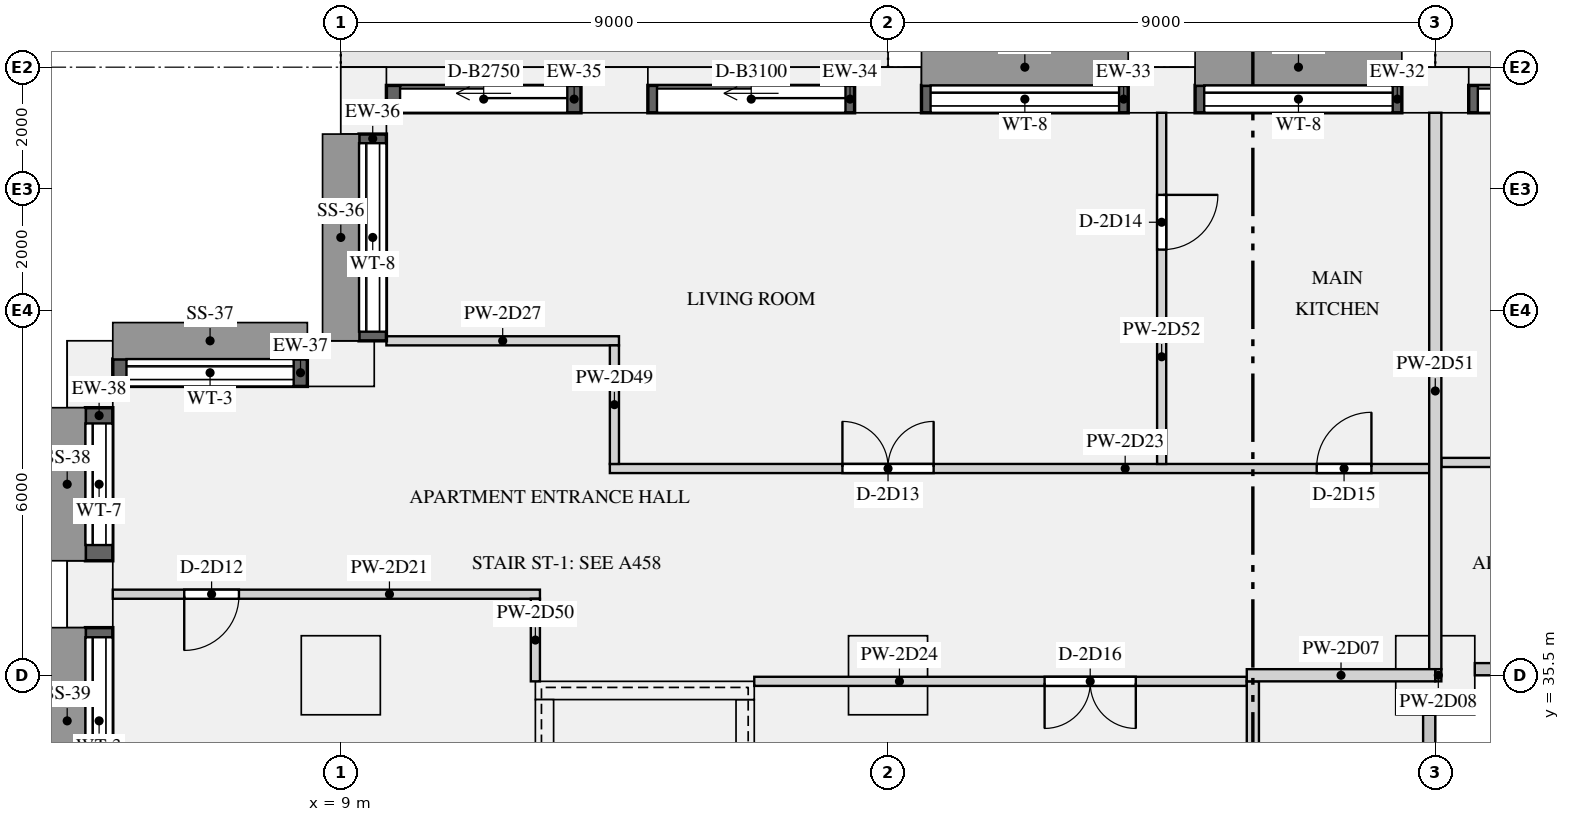
"""IFC4 building model, lengths in metres.
Left out: names, types, materials, properties, quantities, classifications, styles, units other than length and angle.
Written with IfcOpenShell. Run it as: python <this file> out.ifc"""

import sys

from ifc_helpers import new_model, si_unit, direction, frame, frame_2d, origin, origin_2d, place, context, subcontext, project, spatial, rectangle, extrude, element, fill, save


model = new_model("IFC4")
c1 = context("Model", 3, precision=1e-05, world=origin(), true_north=direction((0.0, 1.0)))
c2 = subcontext(c1, "Body", "Model", "MODEL_VIEW")
j1 = project(units=[si_unit("LENGTHUNIT", "METRE"), si_unit("PLANEANGLEUNIT", "RADIAN")], contexts=[c1])
p1 = place(None, origin())
s1 = spatial("IfcSite", under=j1, at=p1, CompositionType="ELEMENT")
p2 = place(p1, origin())
s2 = spatial("IfcBuilding", under=s1, at=p2, CompositionType="ELEMENT")
p3 = place(p2, frame((0.0, 0.0, 111.9)))
s3 = spatial("IfcBuildingStorey", under=s2, at=p3, CompositionType="ELEMENT", Elevation=111.9)
for number, where, z_axis, x_axis in (
    (1, (27.0, 45.125, 0.0), (0.0, 0.0, 1.0), (-1.0, 0.0, 0.0)),
    (2, (22.5, 45.125, 0.0), (0.0, 0.0, 1.0), (-1.0, 0.0, 0.0)),
    (3, (18.0, 45.125, 0.0), (0.0, 0.0, 1.0), (-1.0, 0.0, 0.0)),
    (4, (13.5, 45.125, 0.0), (0.0, 0.0, 1.0), (-1.0, 0.0, 0.0)),
    (5, (9.375, 44.95, 0.0), (0.0, 0.0, 1.0), (0.0, -1.0, 0.0)),
    (6, (9.0, 40.625, 0.0), (0.0, 0.0, 1.0), (-1.0, 0.0, 0.0)),
    (7, (4.875, 40.45, 0.0), (0.0, 0.0, 1.0), (0.0, -1.0, 0.0)),
    (8, (4.875, 36.833, 0.0), (0.0, 0.0, 1.0), (0.0, -1.0, 0.0)),
):
    element("IfcColumn", number, at=place(p3, frame(where, z_axis=z_axis, x_axis=x_axis)), inside=s3, PredefinedType="USERDEFINED", context=c2, shape_type="SweptSolid", body=[
        extrude(rectangle(XDim=1.1, YDim=0.75, at=origin_2d()), origin(), (0.0, 0.0, 1.0), 3.15),
    ])
for number, where, z_axis, x_axis in (
    (9, (9.0, 35.5, 0.0), (0.0, 0.0, 1.0), (1.0, 0.0, 0.0)),
    (10, (18.0, 35.5, 0.0), (0.0, 0.0, 1.0), (1.0, 0.0, 0.0)),
    (11, (27.0, 35.5, 0.0), (0.0, 0.0, 1.0), (1.0, 0.0, 0.0)),
):
    element("IfcColumn", number, at=place(p3, frame(where, z_axis=z_axis, x_axis=x_axis)), inside=s3, PredefinedType="COLUMN", context=c2, shape_type="SweptSolid", body=[
        extrude(rectangle(XDim=1.3, YDim=1.3, at=origin_2d()), origin(), (0.0, 0.0, 1.0), 3.15),
    ])
p4 = place(p3, frame((12.2, 35.25, 0.0), z_axis=(0.0, 0.0, 1.0), x_axis=(1.0, 0.0, 0.0)))
e12 = element("IfcWall", 12, at=p4, inside=s3, PredefinedType="SHEAR", context=c2, shape_type="SweptSolid", body=[
    extrude(rectangle(XDim=3.6, YDim=0.3, at=frame_2d((1.8, 0.0))), origin(), (0.0, 0.0, 1.0), 3.15),
])
for number, where, z_axis, x_axis in (
    (13, (12.35, 27.3, 0.0), (0.0, 0.0, 1.0), (0.0, 1.0, 0.0)),
    (14, (15.65, 27.3, 0.0), (0.0, 0.0, 1.0), (0.0, 1.0, 0.0)),
):
    element("IfcWall", number, at=place(p3, frame(where, z_axis=z_axis, x_axis=x_axis)), inside=s3, PredefinedType="SHEAR", context=c2, shape_type="SweptSolid", body=[
        extrude(rectangle(XDim=7.8, YDim=0.3, at=frame_2d((3.9, 0.0))), origin(), (0.0, 0.0, 1.0), 3.15),
    ])
p5 = place(p3, frame((30.95, 44.975, 0.0), z_axis=(0.0, 0.0, 1.0), x_axis=(-1.0, 0.0, 0.0)))
e15 = element("IfcWall", 15, at=p5, inside=s3, PredefinedType="SOLIDWALL", context=c2, shape_type="SweptSolid", body=[
    extrude(rectangle(XDim=3.4, YDim=0.45, at=frame_2d((1.7, 0.0))), origin(), (0.0, 0.0, 1.0), 2.83),
])
p6 = place(p5, frame((0.15, 0.0, 0.0)))
e16 = element("IfcOpeningElement", 16, at=p6, cuts=e15, PredefinedType="OPENING", context=c2, shape_type="SweptSolid", body=[
    extrude(rectangle(XDim=3.1, YDim=2.3, at=frame_2d((1.55, 1.15))), frame((0.0, 0.235, 0.0), z_axis=(0.0, -1.0, 0.0), x_axis=(1.0, 0.0, 0.0)), (0.0, 0.0, 1.0), 0.47),
])
p7 = place(p3, frame((26.45, 44.975, 0.9), z_axis=(0.0, 0.0, 1.0), x_axis=(-1.0, 0.0, 0.0)))
e17 = element("IfcWall", 17, at=p7, inside=s3, PredefinedType="SOLIDWALL", context=c2, shape_type="SweptSolid", body=[
    extrude(rectangle(XDim=3.4, YDim=0.45, at=frame_2d((1.7, 0.0))), origin(), (0.0, 0.0, 1.0), 1.93),
])
p8 = place(p7, frame((0.15, 0.0, 0.15)))
e18 = element("IfcOpeningElement", 18, at=p8, cuts=e17, PredefinedType="OPENING", context=c2, shape_type="SweptSolid", body=[
    extrude(rectangle(XDim=3.1, YDim=1.5, at=frame_2d((1.55, 0.75))), frame((0.0, 0.235, 0.0), z_axis=(0.0, -1.0, 0.0), x_axis=(1.0, 0.0, 0.0)), (0.0, 0.0, 1.0), 0.47),
])
p9 = place(p3, frame((21.95, 44.975, 0.9), z_axis=(0.0, 0.0, 1.0), x_axis=(-1.0, 0.0, 0.0)))
e19 = element("IfcWall", 19, at=p9, inside=s3, PredefinedType="SOLIDWALL", context=c2, shape_type="SweptSolid", body=[
    extrude(rectangle(XDim=3.4, YDim=0.45, at=frame_2d((1.7, 0.0))), origin(), (0.0, 0.0, 1.0), 1.93),
])
p10 = place(p9, frame((0.15, 0.0, 0.15)))
e20 = element("IfcOpeningElement", 20, at=p10, cuts=e19, PredefinedType="OPENING", context=c2, shape_type="SweptSolid", body=[
    extrude(rectangle(XDim=3.1, YDim=1.5, at=frame_2d((1.55, 0.75))), frame((0.0, 0.235, 0.0), z_axis=(0.0, -1.0, 0.0), x_axis=(1.0, 0.0, 0.0)), (0.0, 0.0, 1.0), 0.47),
])
p11 = place(p3, frame((17.45, 44.975, 0.0), z_axis=(0.0, 0.0, 1.0), x_axis=(-1.0, 0.0, 0.0)))
e21 = element("IfcWall", 21, at=p11, inside=s3, PredefinedType="SOLIDWALL", context=c2, shape_type="SweptSolid", body=[
    extrude(rectangle(XDim=3.4, YDim=0.45, at=frame_2d((1.7, 0.0))), origin(), (0.0, 0.0, 1.0), 2.83),
])
p12 = place(p11, frame((0.15, 0.0, 0.0)))
e22 = element("IfcOpeningElement", 22, at=p12, cuts=e21, PredefinedType="OPENING", context=c2, shape_type="SweptSolid", body=[
    extrude(rectangle(XDim=3.1, YDim=2.3, at=frame_2d((1.55, 1.15))), frame((0.0, 0.235, 0.0), z_axis=(0.0, -1.0, 0.0), x_axis=(1.0, 0.0, 0.0)), (0.0, 0.0, 1.0), 0.47),
])
p13 = place(p3, frame((12.95, 44.975, 0.0), z_axis=(0.0, 0.0, 1.0), x_axis=(-1.0, 0.0, 0.0)))
e23 = element("IfcWall", 23, at=p13, inside=s3, PredefinedType="SOLIDWALL", context=c2, shape_type="SweptSolid", body=[
    extrude(rectangle(XDim=3.2, YDim=0.45, at=frame_2d((1.6, 0.0))), origin(), (0.0, 0.0, 1.0), 2.83),
])
p14 = place(p13, frame((0.225, 0.0, 0.0)))
e24 = element("IfcOpeningElement", 24, at=p14, cuts=e23, PredefinedType="OPENING", context=c2, shape_type="SweptSolid", body=[
    extrude(rectangle(XDim=2.75, YDim=2.3, at=frame_2d((1.375, 1.15))), frame((0.0, 0.235, 0.0), z_axis=(0.0, -1.0, 0.0), x_axis=(1.0, 0.0, 0.0)), (0.0, 0.0, 1.0), 0.47),
])
p15 = place(p3, frame((9.525, 44.4, 0.9), z_axis=(0.0, 0.0, 1.0), x_axis=(0.0, -1.0, 0.0)))
e25 = element("IfcWall", 25, at=p15, inside=s3, PredefinedType="SOLIDWALL", context=c2, shape_type="SweptSolid", body=[
    extrude(rectangle(XDim=3.4, YDim=0.45, at=frame_2d((1.7, 0.0))), origin(), (0.0, 0.0, 1.0), 1.93),
])
p16 = place(p15, frame((0.15, 0.0, 0.15)))
e26 = element("IfcOpeningElement", 26, at=p16, cuts=e25, PredefinedType="OPENING", context=c2, shape_type="SweptSolid", body=[
    extrude(rectangle(XDim=3.1, YDim=1.5, at=frame_2d((1.55, 0.75))), frame((0.0, 0.235, 0.0), z_axis=(0.0, -1.0, 0.0), x_axis=(1.0, 0.0, 0.0)), (0.0, 0.0, 1.0), 0.47),
])
p17 = place(p3, frame((8.45, 40.475, 0.9), z_axis=(0.0, 0.0, 1.0), x_axis=(-1.0, 0.0, 0.0)))
e27 = element("IfcWall", 27, at=p17, inside=s3, PredefinedType="SOLIDWALL", context=c2, shape_type="SweptSolid", body=[
    extrude(rectangle(XDim=3.2, YDim=0.45, at=frame_2d((1.6, 0.0))), origin(), (0.0, 0.0, 1.0), 1.93),
])
p18 = place(p17, frame((0.225, 0.0, 0.15)))
e28 = element("IfcOpeningElement", 28, at=p18, cuts=e27, PredefinedType="OPENING", context=c2, shape_type="SweptSolid", body=[
    extrude(rectangle(XDim=2.75, YDim=1.5, at=frame_2d((1.375, 0.75))), frame((0.0, 0.235, 0.0), z_axis=(0.0, -1.0, 0.0), x_axis=(1.0, 0.0, 0.0)), (0.0, 0.0, 1.0), 0.47),
])
p19 = place(p3, frame((5.025, 39.9, 0.9), z_axis=(0.0, 0.0, 1.0), x_axis=(0.0, -1.0, 0.0)))
e29 = element("IfcWall", 29, at=p19, inside=s3, PredefinedType="SOLIDWALL", context=c2, shape_type="SweptSolid", body=[
    extrude(rectangle(XDim=2.517, YDim=0.45, at=frame_2d((1.258, 0.0))), origin(), (0.0, 0.0, 1.0), 1.93),
])
p20 = place(p19, frame((0.259, 0.0, 0.15)))
e30 = element("IfcOpeningElement", 30, at=p20, cuts=e29, PredefinedType="OPENING", context=c2, shape_type="SweptSolid", body=[
    extrude(rectangle(XDim=2.0, YDim=1.5, at=frame_2d((1.0, 0.75))), frame((0.0, 0.235, 0.0), z_axis=(0.0, -1.0, 0.0), x_axis=(1.0, 0.0, 0.0)), (0.0, 0.0, 1.0), 0.47),
])
p21 = place(p3, frame((5.025, 36.283, 0.9), z_axis=(0.0, 0.0, 1.0), x_axis=(0.0, -1.0, 0.0)))
e31 = element("IfcWall", 31, at=p21, inside=s3, PredefinedType="SOLIDWALL", context=c2, shape_type="SweptSolid", body=[
    extrude(rectangle(XDim=3.066, YDim=0.45, at=frame_2d((1.533, 0.0))), origin(), (0.0, 0.0, 1.0), 1.93),
])
p22 = place(p21, frame((0.158, 0.0, 0.15)))
e32 = element("IfcOpeningElement", 32, at=p22, cuts=e31, PredefinedType="OPENING", context=c2, shape_type="SweptSolid", body=[
    extrude(rectangle(XDim=2.75, YDim=1.5, at=frame_2d((1.375, 0.75))), frame((0.0, 0.235, 0.0), z_axis=(0.0, -1.0, 0.0), x_axis=(1.0, 0.0, 0.0)), (0.0, 0.0, 1.0), 0.47),
])
p23 = place(p3, frame((23.9, 35.5, 0.0), z_axis=(0.0, 0.0, 1.0), x_axis=(1.0, 0.0, 0.0)))
e33 = element("IfcWall", 33, at=p23, inside=s3, PredefinedType="PARTITIONING", context=c2, shape_type="SweptSolid", body=[
    extrude(rectangle(XDim=3.1, YDim=0.2, at=frame_2d((1.55, 0.0))), origin(), (0.0, 0.0, 1.0), 2.83),
])
p24 = place(p3, frame((27.0, 35.5, 0.0), z_axis=(0.0, 0.0, 1.0), x_axis=(1.0, 0.0, 0.0)))
e34 = element("IfcWall", 34, at=p24, inside=s3, PredefinedType="PARTITIONING", context=c2, shape_type="SweptSolid", body=[
    extrude(rectangle(XDim=0.1, YDim=0.2, at=frame_2d((0.05, 0.0))), origin(), (0.0, 0.0, 1.0), 2.83),
])
p25 = place(p3, frame((5.25, 36.833, 0.0), z_axis=(0.0, 0.0, 1.0), x_axis=(1.0, 0.0, 0.0)))
e35 = element("IfcWall", 35, at=p25, inside=s3, PredefinedType="PARTITIONING", context=c2, shape_type="SweptSolid", body=[
    extrude(rectangle(XDim=7.025, YDim=0.15, at=frame_2d((3.512, 0.0))), origin(), (0.0, 0.0, 1.0), 2.83),
])
p26 = place(p25, frame((1.175, 0.0, 0.0)))
e36 = element("IfcOpeningElement", 36, at=p26, cuts=e35, PredefinedType="OPENING", context=c2, shape_type="SweptSolid", body=[
    extrude(rectangle(XDim=0.9, YDim=2.1, at=frame_2d((0.45, 1.05))), frame((0.0, 0.085, 0.0), z_axis=(0.0, -1.0, 0.0), x_axis=(1.0, 0.0, 0.0)), (0.0, 0.0, 1.0), 0.17),
])
p27 = place(p3, frame((13.425, 38.9, 0.0), z_axis=(0.0, 0.0, 1.0), x_axis=(1.0, 0.0, 0.0)))
e37 = element("IfcWall", 37, at=p27, inside=s3, PredefinedType="PARTITIONING", context=c2, shape_type="SweptSolid", body=[
    extrude(rectangle(XDim=13.475, YDim=0.15, at=frame_2d((6.737, 0.0))), origin(), (0.0, 0.0, 1.0), 2.83),
])
p28 = place(p27, frame((3.825, 0.0, 0.0)))
e38 = element("IfcOpeningElement", 38, at=p28, cuts=e37, PredefinedType="OPENING", context=c2, shape_type="SweptSolid", body=[
    extrude(rectangle(XDim=1.5, YDim=2.1, at=frame_2d((0.75, 1.05))), frame((0.0, 0.085, 0.0), z_axis=(0.0, -1.0, 0.0), x_axis=(1.0, 0.0, 0.0)), (0.0, 0.0, 1.0), 0.17),
])
p29 = place(p27, frame((11.625, 0.0, 0.0)))
e39 = element("IfcOpeningElement", 39, at=p29, cuts=e37, PredefinedType="OPENING", context=c2, shape_type="SweptSolid", body=[
    extrude(rectangle(XDim=0.9, YDim=2.1, at=frame_2d((0.45, 1.05))), frame((0.0, 0.085, 0.0), z_axis=(0.0, -1.0, 0.0), x_axis=(1.0, 0.0, 0.0)), (0.0, 0.0, 1.0), 0.17),
])
p30 = place(p3, frame((15.8, 35.4, 0.0), z_axis=(0.0, 0.0, 1.0), x_axis=(1.0, 0.0, 0.0)))
e40 = element("IfcWall", 40, at=p30, inside=s3, PredefinedType="PARTITIONING", context=c2, shape_type="SweptSolid", body=[
    extrude(rectangle(XDim=8.1, YDim=0.15, at=frame_2d((4.05, 0.0))), origin(), (0.0, 0.0, 1.0), 2.83),
])
p31 = place(p30, frame((4.775, 0.0, 0.0)))
e41 = element("IfcOpeningElement", 41, at=p31, cuts=e40, PredefinedType="OPENING", context=c2, shape_type="SweptSolid", body=[
    extrude(rectangle(XDim=1.5, YDim=2.1, at=frame_2d((0.75, 1.05))), frame((0.0, 0.085, 0.0), z_axis=(0.0, -1.0, 0.0), x_axis=(1.0, 0.0, 0.0)), (0.0, 0.0, 1.0), 0.17),
])
p32 = place(p3, frame((9.75, 41.0, 0.0), z_axis=(0.0, 0.0, 1.0), x_axis=(1.0, 0.0, 0.0)))
e42 = element("IfcWall", 42, at=p32, inside=s3, PredefinedType="PARTITIONING", context=c2, shape_type="SweptSolid", body=[
    extrude(rectangle(XDim=3.825, YDim=0.15, at=frame_2d((1.913, 0.0))), origin(), (0.0, 0.0, 1.0), 2.83),
])
p33 = place(p3, frame((27.1, 39.0, 0.0), z_axis=(0.0, 0.0, 1.0), x_axis=(1.0, 0.0, 0.0)))
e43 = element("IfcWall", 43, at=p33, inside=s3, PredefinedType="PARTITIONING", context=c2, shape_type="SweptSolid", body=[
    extrude(rectangle(XDim=22.475, YDim=0.15, at=frame_2d((11.237, 0.0))), origin(), (0.0, 0.0, 1.0), 2.83),
])
p34 = place(p33, frame((1.7, 0.0, 0.0)))
e44 = element("IfcOpeningElement", 44, at=p34, cuts=e43, PredefinedType="OPENING", context=c2, shape_type="SweptSolid", body=[
    extrude(rectangle(XDim=0.9, YDim=2.1, at=frame_2d((0.45, 1.05))), frame((0.0, 0.085, 0.0), z_axis=(0.0, -1.0, 0.0), x_axis=(1.0, 0.0, 0.0)), (0.0, 0.0, 1.0), 0.17),
])
p35 = place(p33, frame((6.2, 0.0, 0.0)))
e45 = element("IfcOpeningElement", 45, at=p35, cuts=e43, PredefinedType="OPENING", context=c2, shape_type="SweptSolid", body=[
    extrude(rectangle(XDim=0.9, YDim=2.1, at=frame_2d((0.45, 1.05))), frame((0.0, 0.085, 0.0), z_axis=(0.0, -1.0, 0.0), x_axis=(1.0, 0.0, 0.0)), (0.0, 0.0, 1.0), 0.17),
])
p36 = place(p33, frame((12.95, 0.0, 0.0)))
e46 = element("IfcOpeningElement", 46, at=p36, cuts=e43, PredefinedType="OPENING", context=c2, shape_type="SweptSolid", body=[
    extrude(rectangle(XDim=0.9, YDim=2.1, at=frame_2d((0.45, 1.05))), frame((0.0, 0.085, 0.0), z_axis=(0.0, -1.0, 0.0), x_axis=(1.0, 0.0, 0.0)), (0.0, 0.0, 1.0), 0.17),
])
p37 = place(p3, frame((24.0, 27.1, 0.0), z_axis=(0.0, 0.0, 1.0), x_axis=(0.0, 1.0, 0.0)))
e47 = element("IfcWall", 47, at=p37, inside=s3, PredefinedType="PARTITIONING", context=c2, shape_type="SweptSolid", body=[
    extrude(rectangle(XDim=8.3, YDim=0.2, at=frame_2d((4.15, 0.0))), origin(), (0.0, 0.0, 1.0), 2.83),
])
p38 = place(p3, frame((13.5, 38.975, 0.0), z_axis=(0.0, 0.0, 1.0), x_axis=(0.0, 1.0, 0.0)))
e48 = element("IfcWall", 48, at=p38, inside=s3, PredefinedType="PARTITIONING", context=c2, shape_type="SweptSolid", body=[
    extrude(rectangle(XDim=1.95, YDim=0.15, at=frame_2d((0.975, 0.0))), origin(), (0.0, 0.0, 1.0), 2.83),
])
p39 = place(p3, frame((12.2, 35.4, 0.0), z_axis=(0.0, 0.0, 1.0), x_axis=(0.0, 1.0, 0.0)))
e49 = element("IfcWall", 49, at=p39, inside=s3, PredefinedType="PARTITIONING", context=c2, shape_type="SweptSolid", body=[
    extrude(rectangle(XDim=1.358, YDim=0.15, at=frame_2d((0.679, 0.0))), origin(), (0.0, 0.0, 1.0), 2.83),
])
p40 = place(p3, frame((27.0, 35.6, 0.0), z_axis=(0.0, 0.0, 1.0), x_axis=(0.0, 1.0, 0.0)))
e50 = element("IfcWall", 50, at=p40, inside=s3, PredefinedType="PARTITIONING", context=c2, shape_type="SweptSolid", body=[
    extrude(rectangle(XDim=9.15, YDim=0.2, at=frame_2d((4.575, 0.0))), origin(), (0.0, 0.0, 1.0), 2.83),
])
p41 = place(p3, frame((22.5, 38.975, 0.0), z_axis=(0.0, 0.0, 1.0), x_axis=(0.0, 1.0, 0.0)))
e51 = element("IfcWall", 51, at=p41, inside=s3, PredefinedType="PARTITIONING", context=c2, shape_type="SweptSolid", body=[
    extrude(rectangle(XDim=5.775, YDim=0.15, at=frame_2d((2.887, 0.0))), origin(), (0.0, 0.0, 1.0), 2.83),
])
p42 = place(p41, frame((3.525, 0.0, 0.0)))
e52 = element("IfcOpeningElement", 52, at=p42, cuts=e51, PredefinedType="OPENING", context=c2, shape_type="SweptSolid", body=[
    extrude(rectangle(XDim=0.9, YDim=2.1, at=frame_2d((0.45, 1.05))), frame((0.0, 0.085, 0.0), z_axis=(0.0, -1.0, 0.0), x_axis=(1.0, 0.0, 0.0)), (0.0, 0.0, 1.0), 0.17),
])
p43 = place(p6, origin())
e53 = element("IfcDoor", 53, at=p43, inside=s3, OperationType="SLIDING_TO_LEFT", PredefinedType="DOOR", context=c2, shape_type="SweptSolid", body=[
    extrude(rectangle(XDim=3.1, YDim=2.3, at=frame_2d((1.55, 1.15))), frame((0.0, -0.07, 0.0), z_axis=(0.0, -1.0, 0.0), x_axis=(1.0, 0.0, 0.0)), (0.0, 0.0, 1.0), 0.05),
])
fill(e16, e53)
p44 = place(p8, origin())
e54 = element("IfcWindow", 54, at=p44, inside=s3, PartitioningType="SINGLE_PANEL", PredefinedType="WINDOW", context=c2, shape_type="SweptSolid", body=[
    extrude(rectangle(XDim=3.1, YDim=1.5, at=frame_2d((1.55, 0.75))), frame((0.0, -0.065, 0.0), z_axis=(0.0, -1.0, 0.0), x_axis=(1.0, 0.0, 0.0)), (0.0, 0.0, 1.0), 0.06),
])
fill(e18, e54)
p45 = place(p10, origin())
e55 = element("IfcWindow", 55, at=p45, inside=s3, PartitioningType="SINGLE_PANEL", PredefinedType="WINDOW", context=c2, shape_type="SweptSolid", body=[
    extrude(rectangle(XDim=3.1, YDim=1.5, at=frame_2d((1.55, 0.75))), frame((0.0, -0.065, 0.0), z_axis=(0.0, -1.0, 0.0), x_axis=(1.0, 0.0, 0.0)), (0.0, 0.0, 1.0), 0.06),
])
fill(e20, e55)
p46 = place(p12, origin())
e56 = element("IfcDoor", 56, at=p46, inside=s3, OperationType="SLIDING_TO_LEFT", PredefinedType="DOOR", context=c2, shape_type="SweptSolid", body=[
    extrude(rectangle(XDim=3.1, YDim=2.3, at=frame_2d((1.55, 1.15))), frame((0.0, -0.07, 0.0), z_axis=(0.0, -1.0, 0.0), x_axis=(1.0, 0.0, 0.0)), (0.0, 0.0, 1.0), 0.05),
])
fill(e22, e56)
p47 = place(p14, origin())
e57 = element("IfcDoor", 57, at=p47, inside=s3, OperationType="SLIDING_TO_LEFT", PredefinedType="DOOR", context=c2, shape_type="SweptSolid", body=[
    extrude(rectangle(XDim=2.75, YDim=2.3, at=frame_2d((1.375, 1.15))), frame((0.0, -0.07, 0.0), z_axis=(0.0, -1.0, 0.0), x_axis=(1.0, 0.0, 0.0)), (0.0, 0.0, 1.0), 0.05),
])
fill(e24, e57)
p48 = place(p16, origin())
e58 = element("IfcWindow", 58, at=p48, inside=s3, PartitioningType="SINGLE_PANEL", PredefinedType="WINDOW", context=c2, shape_type="SweptSolid", body=[
    extrude(rectangle(XDim=3.1, YDim=1.5, at=frame_2d((1.55, 0.75))), frame((0.0, -0.065, 0.0), z_axis=(0.0, -1.0, 0.0), x_axis=(1.0, 0.0, 0.0)), (0.0, 0.0, 1.0), 0.06),
])
fill(e26, e58)
p49 = place(p18, origin())
e59 = element("IfcWindow", 59, at=p49, inside=s3, PartitioningType="SINGLE_PANEL", PredefinedType="WINDOW", context=c2, shape_type="SweptSolid", body=[
    extrude(rectangle(XDim=2.75, YDim=1.5, at=frame_2d((1.375, 0.75))), frame((0.0, -0.065, 0.0), z_axis=(0.0, -1.0, 0.0), x_axis=(1.0, 0.0, 0.0)), (0.0, 0.0, 1.0), 0.06),
])
fill(e28, e59)
p50 = place(p20, origin())
e60 = element("IfcWindow", 60, at=p50, inside=s3, PartitioningType="SINGLE_PANEL", PredefinedType="WINDOW", context=c2, shape_type="SweptSolid", body=[
    extrude(rectangle(XDim=2.0, YDim=1.5, at=frame_2d((1.0, 0.75))), frame((0.0, -0.065, 0.0), z_axis=(0.0, -1.0, 0.0), x_axis=(1.0, 0.0, 0.0)), (0.0, 0.0, 1.0), 0.06),
])
fill(e30, e60)
p51 = place(p22, origin())
e61 = element("IfcWindow", 61, at=p51, inside=s3, PartitioningType="SINGLE_PANEL", PredefinedType="WINDOW", context=c2, shape_type="SweptSolid", body=[
    extrude(rectangle(XDim=2.75, YDim=1.5, at=frame_2d((1.375, 0.75))), frame((0.0, -0.065, 0.0), z_axis=(0.0, -1.0, 0.0), x_axis=(1.0, 0.0, 0.0)), (0.0, 0.0, 1.0), 0.06),
])
fill(e32, e61)
p52 = place(p26, frame((0.9, 0.0, 0.0), z_axis=(0.0, 0.0, 1.0), x_axis=(-1.0, 0.0, 0.0)))
e62 = element("IfcDoor", 62, at=p52, inside=s3, OperationType="SINGLE_SWING_RIGHT", PredefinedType="DOOR", context=c2, shape_type="SweptSolid", body=[
    extrude(rectangle(XDim=0.9, YDim=2.1, at=frame_2d((0.45, 1.05))), frame((0.0, 0.025, 0.0), z_axis=(0.0, -1.0, 0.0), x_axis=(1.0, 0.0, 0.0)), (0.0, 0.0, 1.0), 0.05),
])
fill(e36, e62)
p53 = place(p28, origin())
e63 = element("IfcDoor", 63, at=p53, inside=s3, OperationType="DOUBLE_DOOR_SINGLE_SWING", PredefinedType="DOOR", context=c2, shape_type="SweptSolid", body=[
    extrude(rectangle(XDim=1.5, YDim=2.1, at=frame_2d((0.75, 1.05))), frame((0.0, 0.025, 0.0), z_axis=(0.0, -1.0, 0.0), x_axis=(1.0, 0.0, 0.0)), (0.0, 0.0, 1.0), 0.05),
])
fill(e38, e63)
p54 = place(p42, frame((0.9, 0.0, 0.0), z_axis=(0.0, 0.0, 1.0), x_axis=(-1.0, 0.0, 0.0)))
e64 = element("IfcDoor", 64, at=p54, inside=s3, OperationType="SINGLE_SWING_LEFT", PredefinedType="DOOR", context=c2, shape_type="SweptSolid", body=[
    extrude(rectangle(XDim=0.9, YDim=2.1, at=frame_2d((0.45, 1.05))), frame((0.0, 0.025, 0.0), z_axis=(0.0, -1.0, 0.0), x_axis=(1.0, 0.0, 0.0)), (0.0, 0.0, 1.0), 0.05),
])
fill(e52, e64)
p55 = place(p29, origin())
e65 = element("IfcDoor", 65, at=p55, inside=s3, OperationType="SINGLE_SWING_RIGHT", PredefinedType="DOOR", context=c2, shape_type="SweptSolid", body=[
    extrude(rectangle(XDim=0.9, YDim=2.1, at=frame_2d((0.45, 1.05))), frame((0.0, 0.025, 0.0), z_axis=(0.0, -1.0, 0.0), x_axis=(1.0, 0.0, 0.0)), (0.0, 0.0, 1.0), 0.05),
])
fill(e39, e65)
p56 = place(p31, frame((1.5, 0.0, 0.0), z_axis=(0.0, 0.0, 1.0), x_axis=(-1.0, 0.0, 0.0)))
e66 = element("IfcDoor", 66, at=p56, inside=s3, OperationType="DOUBLE_DOOR_SINGLE_SWING", PredefinedType="DOOR", context=c2, shape_type="SweptSolid", body=[
    extrude(rectangle(XDim=1.5, YDim=2.1, at=frame_2d((0.75, 1.05))), frame((0.0, 0.025, 0.0), z_axis=(0.0, -1.0, 0.0), x_axis=(1.0, 0.0, 0.0)), (0.0, 0.0, 1.0), 0.05),
])
fill(e41, e66)
save(model, sys.argv[1])
